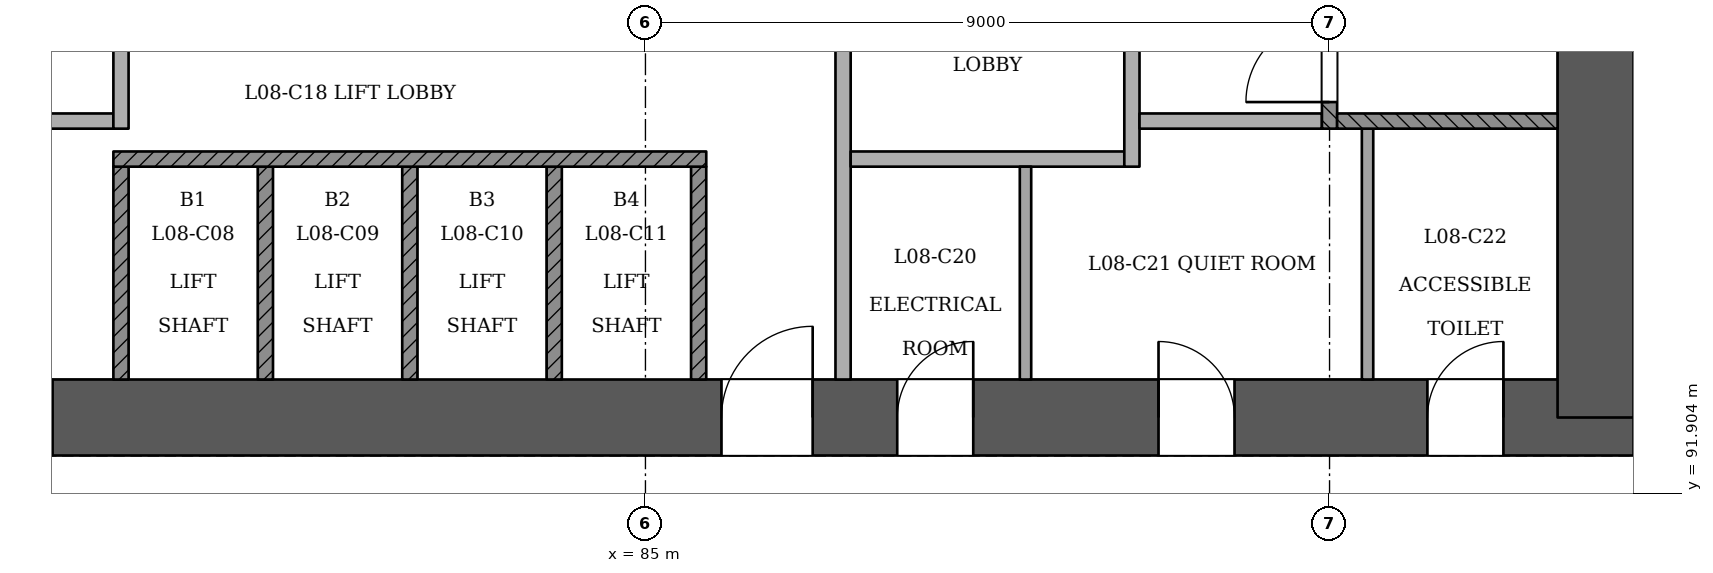
"""IFC4 building model, lengths in metres.
Left out: names, types, materials, properties, quantities, classifications, styles, units other than length and angle.
Written with IfcOpenShell. Run it as: python <this file> out.ifc"""

import sys

from ifc_helpers import new_model, si_unit, direction, frame, frame_2d, origin, place, context, subcontext, project, spatial, rectangle, extrude, element, fill, save


model = new_model("IFC4")
c1 = context("Model", 3, precision=1e-05, world=origin(), true_north=direction((0.0, 1.0)))
c2 = subcontext(c1, "Body", "Model", "MODEL_VIEW")
j1 = project(units=[si_unit("LENGTHUNIT", "METRE"), si_unit("PLANEANGLEUNIT", "RADIAN")], contexts=[c1])
p1 = place(None, origin())
s1 = spatial("IfcSite", under=j1, at=p1, CompositionType="ELEMENT")
p2 = place(p1, origin())
s2 = spatial("IfcBuilding", under=s1, at=p2, CompositionType="ELEMENT")
p3 = place(p2, frame((0.0, 0.0, 37.8)))
s3 = spatial("IfcBuildingStorey", under=s2, at=p3, CompositionType="ELEMENT", Elevation=37.8)
p4 = place(p3, frame((72.5, 92.9, 0.0), z_axis=(0.0, 0.0, 1.0), x_axis=(1.0, 0.0, 0.0)))
e1 = element("IfcWall", 1, at=p4, inside=s3, PredefinedType="SHEAR", context=c2, shape_type="SweptSolid", body=[
    extrude(rectangle(XDim=25.5, YDim=1.0, at=frame_2d((12.75, 0.0))), origin(), (0.0, 0.0, 1.0), 3.6),
])
p5 = place(p4, frame((1.3, 0.0, 0.0)))
e2 = element("IfcOpeningElement", 2, at=p5, cuts=e1, PredefinedType="OPENING", context=c2, shape_type="SweptSolid", body=[
    extrude(rectangle(XDim=1.2, YDim=2.1, at=frame_2d((0.6, 1.05))), frame((0.0, 0.51, 0.0), z_axis=(0.0, -1.0, 0.0), x_axis=(1.0, 0.0, 0.0)), (0.0, 0.0, 1.0), 1.021),
])
p6 = place(p4, frame((3.5, 0.0, 0.0)))
e3 = element("IfcOpeningElement", 3, at=p6, cuts=e1, PredefinedType="OPENING", context=c2, shape_type="SweptSolid", body=[
    extrude(rectangle(XDim=1.2, YDim=2.1, at=frame_2d((0.6, 1.05))), frame((0.0, 0.51, 0.0), z_axis=(0.0, -1.0, 0.0), x_axis=(1.0, 0.0, 0.0)), (0.0, 0.0, 1.0), 1.021),
])
p7 = place(p4, frame((13.5, 0.0, 0.0)))
e4 = element("IfcOpeningElement", 4, at=p7, cuts=e1, PredefinedType="OPENING", context=c2, shape_type="SweptSolid", body=[
    extrude(rectangle(XDim=1.2, YDim=2.1, at=frame_2d((0.6, 1.05))), frame((0.0, 0.51, 0.0), z_axis=(0.0, -1.0, 0.0), x_axis=(1.0, 0.0, 0.0)), (0.0, 0.0, 1.0), 1.021),
])
p8 = place(p4, frame((15.812, 0.0, 0.0)))
e5 = element("IfcOpeningElement", 5, at=p8, cuts=e1, PredefinedType="OPENING", context=c2, shape_type="SweptSolid", body=[
    extrude(rectangle(XDim=1.0, YDim=2.1, at=frame_2d((0.5, 1.05))), frame((0.0, 0.51, 0.0), z_axis=(0.0, -1.0, 0.0), x_axis=(1.0, 0.0, 0.0)), (0.0, 0.0, 1.0), 1.021),
])
p9 = place(p4, frame((19.25, 0.0, 0.0)))
e6 = element("IfcOpeningElement", 6, at=p9, cuts=e1, PredefinedType="OPENING", context=c2, shape_type="SweptSolid", body=[
    extrude(rectangle(XDim=1.0, YDim=2.1, at=frame_2d((0.5, 1.05))), frame((0.0, 0.51, 0.0), z_axis=(0.0, -1.0, 0.0), x_axis=(1.0, 0.0, 0.0)), (0.0, 0.0, 1.0), 1.021),
])
p10 = place(p4, frame((22.788, 0.0, 0.0)))
e7 = element("IfcOpeningElement", 7, at=p10, cuts=e1, PredefinedType="OPENING", context=c2, shape_type="SweptSolid", body=[
    extrude(rectangle(XDim=1.0, YDim=2.1, at=frame_2d((0.5, 1.05))), frame((0.0, 0.51, 0.0), z_axis=(0.0, -1.0, 0.0), x_axis=(1.0, 0.0, 0.0)), (0.0, 0.0, 1.0), 1.021),
])
p11 = place(p3, frame((97.5, 92.9, 0.0), z_axis=(0.0, 0.0, 1.0), x_axis=(0.0, 1.0, 0.0)))
e8 = element("IfcWall", 8, at=p11, inside=s3, PredefinedType="SHEAR", context=c2, shape_type="SweptSolid", body=[
    extrude(rectangle(XDim=11.5, YDim=1.0, at=frame_2d((5.75, 0.0))), origin(), (0.0, 0.0, 1.0), 3.6),
])
p12 = place(p3, frame((61.497, 96.54, 0.0), z_axis=(0.0, 0.0, 1.0), x_axis=(0.499995935097, -0.866027750645, 0.0)))
e9 = element("IfcWall", 9, at=p12, inside=s3, PredefinedType="PARTITIONING", context=c2, shape_type="SweptSolid", body=[
    extrude(rectangle(XDim=44.742, YDim=0.15, at=frame_2d((22.371, 0.0))), origin(), (0.0, 0.0, 1.0), 2.7),
])
p13 = place(p12, frame((1.84, 0.0, 0.0)))
e10 = element("IfcOpeningElement", 10, at=p13, cuts=e9, PredefinedType="OPENING", context=c2, shape_type="SweptSolid", body=[
    extrude(rectangle(XDim=1.0, YDim=2.1, at=frame_2d((0.5, 1.05))), frame((0.0, 0.085, 0.0), z_axis=(0.0, -1.0, 0.0), x_axis=(1.0, 0.0, 0.0)), (0.0, 0.0, 1.0), 0.171),
])
p14 = place(p12, frame((4.942, 0.0, 0.0)))
e11 = element("IfcOpeningElement", 11, at=p14, cuts=e9, PredefinedType="OPENING", context=c2, shape_type="SweptSolid", body=[
    extrude(rectangle(XDim=1.1, YDim=2.1, at=frame_2d((0.55, 1.05))), frame((0.0, 0.085, 0.0), z_axis=(0.0, -1.0, 0.0), x_axis=(1.0, 0.0, 0.0)), (0.0, 0.0, 1.0), 0.171),
])
p15 = place(p12, frame((11.651, 0.0, 0.0)))
e12 = element("IfcOpeningElement", 12, at=p15, cuts=e9, PredefinedType="OPENING", context=c2, shape_type="SweptSolid", body=[
    extrude(rectangle(XDim=1.0, YDim=2.1, at=frame_2d((0.5, 1.05))), frame((0.0, 0.085, 0.0), z_axis=(0.0, -1.0, 0.0), x_axis=(1.0, 0.0, 0.0)), (0.0, 0.0, 1.0), 0.171),
])
p16 = place(p12, frame((18.371, 0.0, 0.0)))
e13 = element("IfcOpeningElement", 13, at=p16, cuts=e9, PredefinedType="OPENING", context=c2, shape_type="SweptSolid", body=[
    extrude(rectangle(XDim=1.2, YDim=2.1, at=frame_2d((0.6, 1.05))), frame((0.0, 0.085, 0.0), z_axis=(0.0, -1.0, 0.0), x_axis=(1.0, 0.0, 0.0)), (0.0, 0.0, 1.0), 0.171),
])
p17 = place(p12, frame((23.092, 0.0, 0.0)))
e14 = element("IfcOpeningElement", 14, at=p17, cuts=e9, PredefinedType="OPENING", context=c2, shape_type="SweptSolid", body=[
    extrude(rectangle(XDim=1.0, YDim=2.1, at=frame_2d((0.5, 1.05))), frame((0.0, 0.085, 0.0), z_axis=(0.0, -1.0, 0.0), x_axis=(1.0, 0.0, 0.0)), (0.0, 0.0, 1.0), 0.171),
])
p18 = place(p12, frame((29.767, 0.0, 0.0)))
e15 = element("IfcOpeningElement", 15, at=p18, cuts=e9, PredefinedType="OPENING", context=c2, shape_type="SweptSolid", body=[
    extrude(rectangle(XDim=1.0, YDim=2.1, at=frame_2d((0.5, 1.05))), frame((0.0, 0.085, 0.0), z_axis=(0.0, -1.0, 0.0), x_axis=(1.0, 0.0, 0.0)), (0.0, 0.0, 1.0), 0.171),
])
p19 = place(p12, frame((31.976, 0.0, 0.0)))
e16 = element("IfcOpeningElement", 16, at=p19, cuts=e9, PredefinedType="OPENING", context=c2, shape_type="SweptSolid", body=[
    extrude(rectangle(XDim=1.0, YDim=2.1, at=frame_2d((0.5, 1.05))), frame((0.0, 0.085, 0.0), z_axis=(0.0, -1.0, 0.0), x_axis=(1.0, 0.0, 0.0)), (0.0, 0.0, 1.0), 0.171),
])
p20 = place(p12, frame((38.767, 0.0, 0.0)))
e17 = element("IfcOpeningElement", 17, at=p20, cuts=e9, PredefinedType="OPENING", context=c2, shape_type="SweptSolid", body=[
    extrude(rectangle(XDim=1.0, YDim=2.1, at=frame_2d((0.5, 1.05))), frame((0.0, 0.085, 0.0), z_axis=(0.0, -1.0, 0.0), x_axis=(1.0, 0.0, 0.0)), (0.0, 0.0, 1.0), 0.171),
])
p21 = place(p12, frame((40.707, 0.0, 0.0)))
e18 = element("IfcOpeningElement", 18, at=p21, cuts=e9, PredefinedType="OPENING", context=c2, shape_type="SweptSolid", body=[
    extrude(rectangle(XDim=1.0, YDim=2.1, at=frame_2d((0.5, 1.05))), frame((0.0, 0.085, 0.0), z_axis=(0.0, -1.0, 0.0), x_axis=(1.0, 0.0, 0.0)), (0.0, 0.0, 1.0), 0.171),
])
p22 = place(p3, frame((88.317, 61.577, 0.0), z_axis=(0.0, 0.0, 1.0), x_axis=(0.49999894854, 0.866026010844, 0.0)))
e19 = element("IfcWall", 19, at=p22, inside=s3, PredefinedType="PARTITIONING", context=c2, shape_type="SweptSolid", body=[
    extrude(rectangle(XDim=36.0, YDim=0.15, at=frame_2d((18.0, 0.0))), origin(), (0.0, 0.0, 1.0), 2.7),
])
p23 = place(p22, frame((0.72, 0.0, 0.0)))
e20 = element("IfcOpeningElement", 20, at=p23, cuts=e19, PredefinedType="OPENING", context=c2, shape_type="SweptSolid", body=[
    extrude(rectangle(XDim=1.0, YDim=2.1, at=frame_2d((0.5, 1.05))), frame((0.0, 0.085, 0.0), z_axis=(0.0, -1.0, 0.0), x_axis=(1.0, 0.0, 0.0)), (0.0, 0.0, 1.0), 0.171),
])
p24 = place(p22, frame((7.395, 0.0, 0.0)))
e21 = element("IfcOpeningElement", 21, at=p24, cuts=e19, PredefinedType="OPENING", context=c2, shape_type="SweptSolid", body=[
    extrude(rectangle(XDim=1.0, YDim=2.1, at=frame_2d((0.5, 1.05))), frame((0.0, 0.085, 0.0), z_axis=(0.0, -1.0, 0.0), x_axis=(1.0, 0.0, 0.0)), (0.0, 0.0, 1.0), 0.171),
])
p25 = place(p22, frame((9.605, 0.0, 0.0)))
e22 = element("IfcOpeningElement", 22, at=p25, cuts=e19, PredefinedType="OPENING", context=c2, shape_type="SweptSolid", body=[
    extrude(rectangle(XDim=1.0, YDim=2.1, at=frame_2d((0.5, 1.05))), frame((0.0, 0.085, 0.0), z_axis=(0.0, -1.0, 0.0), x_axis=(1.0, 0.0, 0.0)), (0.0, 0.0, 1.0), 0.171),
])
p26 = place(p22, frame((15.25, 0.0, 0.0)))
e23 = element("IfcOpeningElement", 23, at=p26, cuts=e19, PredefinedType="OPENING", context=c2, shape_type="SweptSolid", body=[
    extrude(rectangle(XDim=1.0, YDim=2.1, at=frame_2d((0.5, 1.05))), frame((0.0, 0.085, 0.0), z_axis=(0.0, -1.0, 0.0), x_axis=(1.0, 0.0, 0.0)), (0.0, 0.0, 1.0), 0.171),
])
p27 = place(p22, frame((18.605, 0.0, 0.0)))
e24 = element("IfcOpeningElement", 24, at=p27, cuts=e19, PredefinedType="OPENING", context=c2, shape_type="SweptSolid", body=[
    extrude(rectangle(XDim=1.0, YDim=2.1, at=frame_2d((0.5, 1.05))), frame((0.0, 0.085, 0.0), z_axis=(0.0, -1.0, 0.0), x_axis=(1.0, 0.0, 0.0)), (0.0, 0.0, 1.0), 0.171),
])
p28 = place(p22, frame((25.395, 0.0, 0.0)))
e25 = element("IfcOpeningElement", 25, at=p28, cuts=e19, PredefinedType="OPENING", context=c2, shape_type="SweptSolid", body=[
    extrude(rectangle(XDim=1.0, YDim=2.1, at=frame_2d((0.5, 1.05))), frame((0.0, 0.085, 0.0), z_axis=(0.0, -1.0, 0.0), x_axis=(1.0, 0.0, 0.0)), (0.0, 0.0, 1.0), 0.171),
])
p29 = place(p22, frame((29.8, 0.0, 0.0)))
e26 = element("IfcOpeningElement", 26, at=p29, cuts=e19, PredefinedType="OPENING", context=c2, shape_type="SweptSolid", body=[
    extrude(rectangle(XDim=1.2, YDim=2.1, at=frame_2d((0.6, 1.05))), frame((0.0, 0.085, 0.0), z_axis=(0.0, -1.0, 0.0), x_axis=(1.0, 0.0, 0.0)), (0.0, 0.0, 1.0), 0.171),
])
for number, where, z_axis, x_axis in (
    (27, (78.1, 93.4, 0.0), (0.0, 0.0, 1.0), (0.0, 1.0, 0.0)),
    (28, (80.0, 93.4, 0.0), (0.0, 0.0, 1.0), (0.0, 1.0, 0.0)),
    (29, (81.9, 93.4, 0.0), (0.0, 0.0, 1.0), (0.0, 1.0, 0.0)),
    (30, (83.8, 93.4, 0.0), (0.0, 0.0, 1.0), (0.0, 1.0, 0.0)),
    (31, (85.7, 93.4, 0.0), (0.0, 0.0, 1.0), (0.0, 1.0, 0.0)),
):
    element("IfcWall", number, at=place(p3, frame(where, z_axis=z_axis, x_axis=x_axis)), inside=s3, PredefinedType="SOLIDWALL", context=c2, shape_type="SweptSolid", body=[
        extrude(rectangle(XDim=2.8, YDim=0.2, at=frame_2d((1.4, 0.0))), origin(), (0.0, 0.0, 1.0), 3.1),
    ])
p30 = place(p3, frame((87.6, 93.4, 0.0), z_axis=(0.0, 0.0, 1.0), x_axis=(0.0, 1.0, 0.0)))
e32 = element("IfcWall", 32, at=p30, inside=s3, PredefinedType="PARTITIONING", context=c2, shape_type="SweptSolid", body=[
    extrude(rectangle(XDim=7.0, YDim=0.2, at=frame_2d((3.5, 0.0))), origin(), (0.0, 0.0, 1.0), 3.1),
])
p31 = place(p30, frame((4.45, 0.0, 0.0)))
e33 = element("IfcOpeningElement", 33, at=p31, cuts=e32, PredefinedType="OPENING", context=c2, shape_type="SweptSolid", body=[
    extrude(rectangle(XDim=1.1, YDim=2.1, at=frame_2d((0.55, 1.05))), frame((0.0, 0.11, 0.0), z_axis=(0.0, -1.0, 0.0), x_axis=(1.0, 0.0, 0.0)), (0.0, 0.0, 1.0), 0.221),
])
p32 = place(p3, frame((90.0, 93.4, 0.0), z_axis=(0.0, 0.0, 1.0), x_axis=(0.0, 1.0, 0.0)))
e34 = element("IfcWall", 34, at=p32, inside=s3, PredefinedType="PARTITIONING", context=c2, shape_type="SweptSolid", body=[
    extrude(rectangle(XDim=2.8, YDim=0.15, at=frame_2d((1.4, 0.0))), origin(), (0.0, 0.0, 1.0), 3.1),
])
p33 = place(p3, frame((94.5, 93.4, 0.0), z_axis=(0.0, 0.0, 1.0), x_axis=(0.0, 1.0, 0.0)))
e35 = element("IfcWall", 35, at=p33, inside=s3, PredefinedType="PARTITIONING", context=c2, shape_type="SweptSolid", body=[
    extrude(rectangle(XDim=3.3, YDim=0.15, at=frame_2d((1.65, 0.0))), origin(), (0.0, 0.0, 1.0), 3.1),
])
p34 = place(p3, frame((78.0, 96.3, 0.0), z_axis=(0.0, 0.0, 1.0), x_axis=(1.0, 0.0, 0.0)))
e36 = element("IfcWall", 36, at=p34, inside=s3, PredefinedType="SOLIDWALL", context=c2, shape_type="SweptSolid", body=[
    extrude(rectangle(XDim=7.8, YDim=0.2, at=frame_2d((3.9, 0.0))), origin(), (0.0, 0.0, 1.0), 3.1),
])
p35 = place(p3, frame((87.7, 96.3, 0.0), z_axis=(0.0, 0.0, 1.0), x_axis=(1.0, 0.0, 0.0)))
e37 = element("IfcWall", 37, at=p35, inside=s3, PredefinedType="PARTITIONING", context=c2, shape_type="SweptSolid", body=[
    extrude(rectangle(XDim=3.6, YDim=0.2, at=frame_2d((1.8, 0.0))), origin(), (0.0, 0.0, 1.0), 3.1),
])
p36 = place(p3, frame((91.4, 96.2, 0.0), z_axis=(0.0, 0.0, 1.0), x_axis=(0.0, 1.0, 0.0)))
e38 = element("IfcWall", 38, at=p36, inside=s3, PredefinedType="PARTITIONING", context=c2, shape_type="SweptSolid", body=[
    extrude(rectangle(XDim=4.2, YDim=0.2, at=frame_2d((2.1, 0.0))), origin(), (0.0, 0.0, 1.0), 3.1),
])
p37 = place(p36, frame((2.45, 0.0, 0.0)))
e39 = element("IfcOpeningElement", 39, at=p37, cuts=e38, PredefinedType="OPENING", context=c2, shape_type="SweptSolid", body=[
    extrude(rectangle(XDim=1.1, YDim=2.1, at=frame_2d((0.55, 1.05))), frame((0.0, 0.11, 0.0), z_axis=(0.0, -1.0, 0.0), x_axis=(1.0, 0.0, 0.0)), (0.0, 0.0, 1.0), 0.221),
])
p38 = place(p3, frame((76.1, 96.8, 0.0), z_axis=(0.0, 0.0, 1.0), x_axis=(1.0, 0.0, 0.0)))
e40 = element("IfcWall", 40, at=p38, inside=s3, PredefinedType="PARTITIONING", context=c2, shape_type="SweptSolid", body=[
    extrude(rectangle(XDim=1.9, YDim=0.2, at=frame_2d((0.95, 0.0))), origin(), (0.0, 0.0, 1.0), 3.1),
])
p39 = place(p3, frame((78.1, 96.7, 0.0), z_axis=(0.0, 0.0, 1.0), x_axis=(0.0, 1.0, 0.0)))
e41 = element("IfcWall", 41, at=p39, inside=s3, PredefinedType="PARTITIONING", context=c2, shape_type="SweptSolid", body=[
    extrude(rectangle(XDim=3.7, YDim=0.2, at=frame_2d((1.85, 0.0))), origin(), (0.0, 0.0, 1.0), 3.1),
])
p40 = place(p39, frame((1.95, 0.0, 0.0)))
e42 = element("IfcOpeningElement", 42, at=p40, cuts=e41, PredefinedType="OPENING", context=c2, shape_type="SweptSolid", body=[
    extrude(rectangle(XDim=1.1, YDim=2.1, at=frame_2d((0.55, 1.05))), frame((0.0, 0.11, 0.0), z_axis=(0.0, -1.0, 0.0), x_axis=(1.0, 0.0, 0.0)), (0.0, 0.0, 1.0), 0.221),
])
p41 = place(p3, frame((91.5, 96.8, 0.0), z_axis=(0.0, 0.0, 1.0), x_axis=(1.0, 0.0, 0.0)))
e43 = element("IfcWall", 43, at=p41, inside=s3, PredefinedType="PARTITIONING", context=c2, shape_type="SweptSolid", body=[
    extrude(rectangle(XDim=2.4, YDim=0.2, at=frame_2d((1.2, 0.0))), origin(), (0.0, 0.0, 1.0), 3.1),
])
p42 = place(p3, frame((94.0, 96.7, 0.0), z_axis=(0.0, 0.0, 1.0), x_axis=(0.0, 1.0, 0.0)))
e44 = element("IfcWall", 44, at=p42, inside=s3, PredefinedType="SOLIDWALL", context=c2, shape_type="SweptSolid", body=[
    extrude(rectangle(XDim=3.7, YDim=0.2, at=frame_2d((1.85, 0.0))), origin(), (0.0, 0.0, 1.0), 3.1),
])
p43 = place(p42, frame((0.35, 0.0, 0.0)))
e45 = element("IfcOpeningElement", 45, at=p43, cuts=e44, PredefinedType="OPENING", context=c2, shape_type="SweptSolid", body=[
    extrude(rectangle(XDim=1.1, YDim=2.1, at=frame_2d((0.55, 1.05))), frame((0.0, 0.11, 0.0), z_axis=(0.0, -1.0, 0.0), x_axis=(1.0, 0.0, 0.0)), (0.0, 0.0, 1.0), 0.221),
])
p44 = place(p3, frame((94.1, 96.8, 0.0), z_axis=(0.0, 0.0, 1.0), x_axis=(1.0, 0.0, 0.0)))
e46 = element("IfcWall", 46, at=p44, inside=s3, PredefinedType="SOLIDWALL", context=c2, shape_type="SweptSolid", body=[
    extrude(rectangle(XDim=2.9, YDim=0.2, at=frame_2d((1.45, 0.0))), origin(), (0.0, 0.0, 1.0), 3.1),
])
p45 = place(p43, origin())
e47 = element("IfcDoor", 47, at=p45, inside=s3, OperationType="SINGLE_SWING_LEFT", PredefinedType="NOTDEFINED", context=c2, shape_type="SweptSolid", body=[
    extrude(rectangle(XDim=1.1, YDim=2.1, at=frame_2d((0.55, 1.05))), frame((0.0, 0.025, 0.0), z_axis=(0.0, -1.0, 0.0), x_axis=(1.0, 0.0, 0.0)), (0.0, 0.0, 1.0), 0.05),
])
fill(e45, e47)
p46 = place(p6, origin())
e48 = element("IfcDoor", 48, at=p46, inside=s3, OperationType="SINGLE_SWING_LEFT", PredefinedType="NOTDEFINED", context=c2, shape_type="SweptSolid", body=[
    extrude(rectangle(XDim=1.2, YDim=2.1, at=frame_2d((0.6, 1.05))), frame((0.0, 0.025, 0.0), z_axis=(0.0, -1.0, 0.0), x_axis=(1.0, 0.0, 0.0)), (0.0, 0.0, 1.0), 0.05),
])
fill(e3, e48)
p47 = place(p7, origin())
e49 = element("IfcDoor", 49, at=p47, inside=s3, OperationType="SINGLE_SWING_RIGHT", PredefinedType="NOTDEFINED", context=c2, shape_type="SweptSolid", body=[
    extrude(rectangle(XDim=1.2, YDim=2.1, at=frame_2d((0.6, 1.05))), frame((0.0, 0.025, 0.0), z_axis=(0.0, -1.0, 0.0), x_axis=(1.0, 0.0, 0.0)), (0.0, 0.0, 1.0), 0.05),
])
fill(e4, e49)
p48 = place(p8, origin())
e50 = element("IfcDoor", 50, at=p48, inside=s3, OperationType="SINGLE_SWING_RIGHT", PredefinedType="NOTDEFINED", context=c2, shape_type="SweptSolid", body=[
    extrude(rectangle(XDim=1.0, YDim=2.1, at=frame_2d((0.5, 1.05))), frame((0.0, 0.025, 0.0), z_axis=(0.0, -1.0, 0.0), x_axis=(1.0, 0.0, 0.0)), (0.0, 0.0, 1.0), 0.05),
])
fill(e5, e50)
p49 = place(p9, origin())
e51 = element("IfcDoor", 51, at=p49, inside=s3, OperationType="SINGLE_SWING_LEFT", PredefinedType="NOTDEFINED", context=c2, shape_type="SweptSolid", body=[
    extrude(rectangle(XDim=1.0, YDim=2.1, at=frame_2d((0.5, 1.05))), frame((0.0, 0.025, 0.0), z_axis=(0.0, -1.0, 0.0), x_axis=(1.0, 0.0, 0.0)), (0.0, 0.0, 1.0), 0.05),
])
fill(e6, e51)
p50 = place(p10, origin())
e52 = element("IfcDoor", 52, at=p50, inside=s3, OperationType="SINGLE_SWING_RIGHT", PredefinedType="NOTDEFINED", context=c2, shape_type="SweptSolid", body=[
    extrude(rectangle(XDim=1.0, YDim=2.1, at=frame_2d((0.5, 1.05))), frame((0.0, 0.025, 0.0), z_axis=(0.0, -1.0, 0.0), x_axis=(1.0, 0.0, 0.0)), (0.0, 0.0, 1.0), 0.05),
])
fill(e7, e52)
save(model, sys.argv[1])
